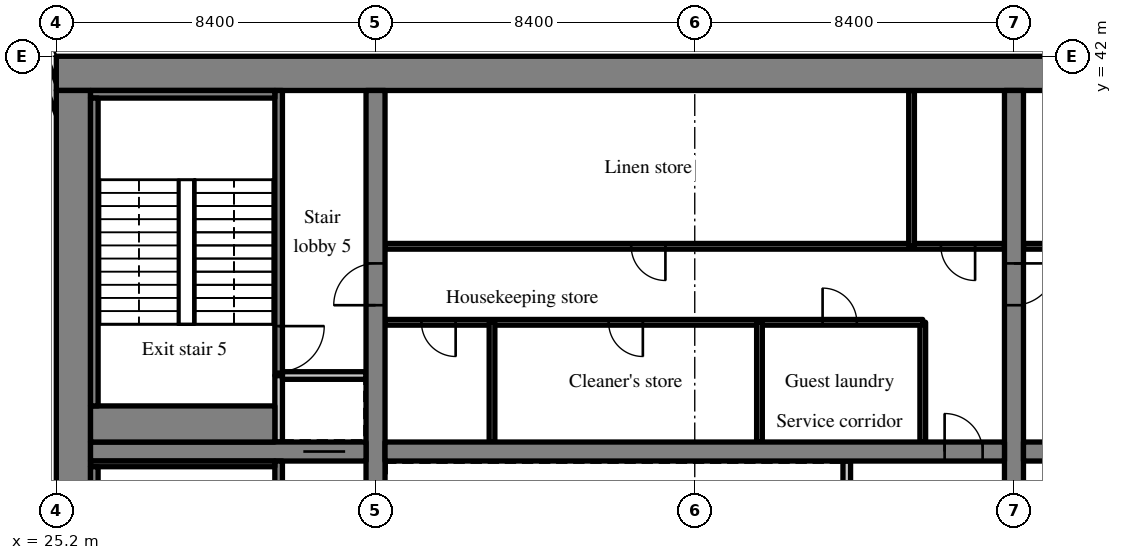
"""IFC4 building model, lengths in metres.
Left out: names, types, materials, properties, quantities, classifications, styles, units other than length and angle.
Written with IfcOpenShell. Run it as: python <this file> out.ifc"""

import sys

from ifc_helpers import new_model, si_unit, direction, frame, frame_2d, origin, place, context, subcontext, project, spatial, rectangle, extrude, source, transform, mapped, element, fill, save


model = new_model("IFC4")
c1 = context("Model", 3, precision=1e-05, world=origin(), true_north=direction((0.0, 1.0)))
c2 = subcontext(c1, "Body", "Model", "MODEL_VIEW")
j1 = project(units=[si_unit("LENGTHUNIT", "METRE"), si_unit("PLANEANGLEUNIT", "RADIAN")], contexts=[c1])
p1 = place(None, origin())
s1 = spatial("IfcSite", under=j1, at=p1, CompositionType="ELEMENT")
p2 = place(p1, origin())
s2 = spatial("IfcBuilding", under=s1, at=p2, CompositionType="ELEMENT")
p3 = place(p2, frame((0.0, 0.0, 114.2)))
s3 = spatial("IfcBuildingStorey", under=s2, at=p3, CompositionType="ELEMENT", Elevation=114.2)
m1 = source(origin(), c2, "Body", "SweptSolid", [
    extrude(rectangle(XDim=50.4, YDim=0.9, at=frame_2d((25.2, 0.0))), origin(), (0.0, 0.0, 1.0), 3.52),
])
p4 = place(p3, frame((25.2, 41.55, 0.0), z_axis=(0.0, 0.0, 1.0), x_axis=(1.0, 0.0, 0.0)))
e1 = element("IfcWall", 1, at=p4, inside=s3, PredefinedType="SHEAR", context=c2, shape_type="MappedRepresentation", body=[
    mapped(m1, transform((0.0, 0.0, 0.0), scale=1.0)),
])
m2 = source(origin(), c2, "Body", "SweptSolid", [
    extrude(rectangle(XDim=18.2, YDim=0.9, at=frame_2d((9.1, 0.0))), origin(), (0.0, 0.0, 1.0), 3.52),
])
p5 = place(p3, frame((25.65, 22.9, 0.0), z_axis=(0.0, 0.0, 1.0), x_axis=(0.0, 1.0, 0.0)))
e2 = element("IfcWall", 2, at=p5, inside=s3, PredefinedType="SHEAR", context=c2, shape_type="MappedRepresentation", body=[
    mapped(m2, transform((0.0, 0.0, 0.0), scale=1.0)),
])
m3 = source(origin(), c2, "Body", "SweptSolid", [
    extrude(rectangle(XDim=18.2, YDim=0.5, at=frame_2d((9.1, 0.0))), origin(), (0.0, 0.0, 1.0), 3.52),
])
p6 = place(p3, frame((33.6, 22.9, 0.0), z_axis=(0.0, 0.0, 1.0), x_axis=(0.0, 1.0, 0.0)))
e3 = element("IfcWall", 3, at=p6, inside=s3, PredefinedType="SHEAR", context=c2, shape_type="MappedRepresentation", body=[
    mapped(m3, transform((0.0, 0.0, 0.0), scale=1.0)),
])
m4 = source(origin(), c2, "Body", "SweptSolid", [
    extrude(rectangle(XDim=1.1, YDim=2.1, at=frame_2d((0.55, 1.05))), frame((0.0, 0.26, 0.0), z_axis=(0.0, -1.0, 0.0), x_axis=(1.0, 0.0, 0.0)), (0.0, 0.0, 1.0), 0.52),
])
p7 = place(p6, frame((12.55, 0.0, 0.0)))
e4 = element("IfcOpeningElement", 4, at=p7, cuts=e3, PredefinedType="OPENING", context=c2, shape_type="MappedRepresentation", body=[
    mapped(m4, transform((0.0, 0.0, 0.0), scale=1.0)),
])
p8 = place(p3, frame((50.4, 22.9, 0.0), z_axis=(0.0, 0.0, 1.0), x_axis=(0.0, 1.0, 0.0)))
e5 = element("IfcWall", 5, at=p8, inside=s3, PredefinedType="SHEAR", context=c2, shape_type="MappedRepresentation", body=[
    mapped(m3, transform((0.0, 0.0, 0.0), scale=1.0)),
])
p9 = place(p8, frame((12.55, 0.0, 0.0)))
e6 = element("IfcOpeningElement", 6, at=p9, cuts=e5, PredefinedType="OPENING", context=c2, shape_type="MappedRepresentation", body=[
    mapped(m4, transform((0.0, 0.0, 0.0), scale=1.0)),
])
m5 = source(origin(), c2, "Body", "SweptSolid", [
    extrude(rectangle(XDim=7.25, YDim=0.5, at=frame_2d((3.625, 0.0))), origin(), (0.0, 0.0, 1.0), 3.52),
])
p10 = place(p3, frame((26.1, 31.6, 0.0), z_axis=(0.0, 0.0, 1.0), x_axis=(1.0, 0.0, 0.0)))
e7 = element("IfcWall", 7, at=p10, inside=s3, PredefinedType="SHEAR", context=c2, shape_type="MappedRepresentation", body=[
    mapped(m5, transform((0.0, 0.0, 0.0), scale=1.0)),
])
p11 = place(p10, frame((5.6, 0.0, 0.0)))
e8 = element("IfcOpeningElement", 8, at=p11, cuts=e7, PredefinedType="OPENING", context=c2, shape_type="MappedRepresentation", body=[
    mapped(m4, transform((0.0, 0.0, 0.0), scale=1.0)),
])
m6 = source(origin(), c2, "Body", "SweptSolid", [
    extrude(rectangle(XDim=16.3, YDim=0.5, at=frame_2d((8.15, 0.0))), origin(), (0.0, 0.0, 1.0), 3.52),
])
p12 = place(p3, frame((33.85, 31.6, 0.0), z_axis=(0.0, 0.0, 1.0), x_axis=(1.0, 0.0, 0.0)))
e9 = element("IfcWall", 9, at=p12, inside=s3, PredefinedType="SHEAR", context=c2, shape_type="MappedRepresentation", body=[
    mapped(m6, transform((0.0, 0.0, 0.0), scale=1.0)),
])
m7 = source(origin(), c2, "Body", "SweptSolid", [
    extrude(rectangle(XDim=1.0, YDim=2.1, at=frame_2d((0.5, 1.05))), frame((0.0, 0.26, 0.0), z_axis=(0.0, -1.0, 0.0), x_axis=(1.0, 0.0, 0.0)), (0.0, 0.0, 1.0), 0.52),
])
p13 = place(p12, frame((14.725, 0.0, 0.0)))
e10 = element("IfcOpeningElement", 10, at=p13, cuts=e9, PredefinedType="OPENING", context=c2, shape_type="MappedRepresentation", body=[
    mapped(m7, transform((0.0, 0.0, 0.0), scale=1.0)),
])
m8 = source(origin(), c2, "Body", "SweptSolid", [
    extrude(rectangle(XDim=16.3, YDim=0.5, at=frame_2d((8.15, 0.0))), origin(), (0.0, 0.0, 1.0), 3.52),
])
p14 = place(p3, frame((50.65, 31.6, 0.0), z_axis=(0.0, 0.0, 1.0), x_axis=(1.0, 0.0, 0.0)))
e11 = element("IfcWall", 11, at=p14, inside=s3, PredefinedType="SHEAR", context=c2, shape_type="MappedRepresentation", body=[
    mapped(m8, transform((0.0, 0.0, 0.0), scale=1.0)),
])
p15 = place(p14, frame((0.575, 0.0, 0.0)))
e12 = element("IfcOpeningElement", 12, at=p15, cuts=e11, PredefinedType="OPENING", context=c2, shape_type="MappedRepresentation", body=[
    mapped(m7, transform((0.0, 0.0, 0.0), scale=1.0)),
])
m9 = source(origin(), c2, "Body", "SweptSolid", [
    extrude(rectangle(XDim=3.559, YDim=0.3, at=frame_2d((1.78, 0.0))), origin(), (0.0, 0.0, 1.0), 3.52),
])
p16 = place(p3, frame((25.55, 39.969, 0.0), z_axis=(0.0, 0.0, 1.0), x_axis=(-0.35779745313, 0.933799219604, 0.0)))
e13 = element("IfcWall", 13, at=p16, inside=s3, PredefinedType="SOLIDWALL", context=c2, shape_type="MappedRepresentation", body=[
    mapped(m9, transform((0.0, 0.0, 0.0), scale=1.0)),
])
m10 = source(origin(), c2, "Body", "SweptSolid", [
    extrude(rectangle(XDim=1.5, YDim=2.0, at=frame_2d((0.75, 1.0))), frame((0.0, 0.16, 0.0), z_axis=(0.0, -1.0, 0.0), x_axis=(1.0, 0.0, 0.0)), (0.0, 0.0, 1.0), 0.32),
])
p17 = place(p16, frame((1.903, 0.0, 0.9)))
e14 = element("IfcOpeningElement", 14, at=p17, cuts=e13, PredefinedType="OPENING", context=c2, shape_type="MappedRepresentation", body=[
    mapped(m10, transform((0.0, 0.0, 0.0), scale=1.0)),
])
m11 = source(origin(), c2, "Body", "SweptSolid", [
    extrude(rectangle(XDim=2.55, YDim=0.2, at=frame_2d((1.275, 0.0))), origin(), (0.0, 0.0, 1.0), 3.52),
])
p18 = place(p3, frame((46.0, 28.8, 0.0), z_axis=(0.0, 0.0, 1.0), x_axis=(0.0, 1.0, 0.0)))
e15 = element("IfcWall", 15, at=p18, inside=s3, PredefinedType="SOLIDWALL", context=c2, shape_type="MappedRepresentation", body=[
    mapped(m11, transform((0.0, 0.0, 0.0), scale=1.0)),
])
m12 = source(origin(), c2, "Body", "SweptSolid", [
    extrude(rectangle(XDim=3.15, YDim=0.15, at=frame_2d((1.575, 0.0))), origin(), (0.0, 0.0, 1.0), 3.52),
])
p19 = place(p3, frame((48.0, 31.85, 0.0), z_axis=(0.0, 0.0, 1.0), x_axis=(0.0, 1.0, 0.0)))
e16 = element("IfcWall", 16, at=p19, inside=s3, PredefinedType="PARTITIONING", context=c2, shape_type="MappedRepresentation", body=[
    mapped(m12, transform((0.0, 0.0, 0.0), scale=1.0)),
])
m13 = source(origin(), c2, "Body", "SweptSolid", [
    extrude(rectangle(XDim=14.15, YDim=0.15, at=frame_2d((7.075, 0.0))), origin(), (0.0, 0.0, 1.0), 3.52),
])
p20 = place(p3, frame((33.85, 35.0, 0.0), z_axis=(0.0, 0.0, 1.0), x_axis=(1.0, 0.0, 0.0)))
e17 = element("IfcWall", 17, at=p20, inside=s3, PredefinedType="PARTITIONING", context=c2, shape_type="MappedRepresentation", body=[
    mapped(m13, transform((0.0, 0.0, 0.0), scale=1.0)),
])
m14 = source(origin(), c2, "Body", "SweptSolid", [
    extrude(rectangle(XDim=0.9, YDim=2.1, at=frame_2d((0.45, 1.05))), frame((0.0, 0.085, 0.0), z_axis=(0.0, -1.0, 0.0), x_axis=(1.0, 0.0, 0.0)), (0.0, 0.0, 1.0), 0.17),
])
p21 = place(p20, frame((0.958, 0.0, 0.0)))
e18 = element("IfcOpeningElement", 18, at=p21, cuts=e17, PredefinedType="OPENING", context=c2, shape_type="MappedRepresentation", body=[
    mapped(m14, transform((0.0, 0.0, 0.0), scale=1.0)),
])
p22 = place(p20, frame((5.884, 0.0, 0.0)))
e19 = element("IfcOpeningElement", 19, at=p22, cuts=e17, PredefinedType="OPENING", context=c2, shape_type="MappedRepresentation", body=[
    mapped(m14, transform((0.0, 0.0, 0.0), scale=1.0)),
])
p23 = place(p20, frame((11.514, 0.0, 0.0)))
e20 = element("IfcOpeningElement", 20, at=p23, cuts=e17, PredefinedType="OPENING", context=c2, shape_type="MappedRepresentation", body=[
    mapped(m14, transform((0.0, 0.0, 0.0), scale=1.0)),
])
m15 = source(origin(), c2, "Body", "SweptSolid", [
    extrude(rectangle(XDim=16.3, YDim=0.15, at=frame_2d((8.15, 0.0))), origin(), (0.0, 0.0, 1.0), 3.52),
])
p24 = place(p3, frame((33.85, 37.0, 0.0), z_axis=(0.0, 0.0, 1.0), x_axis=(1.0, 0.0, 0.0)))
e21 = element("IfcWall", 21, at=p24, inside=s3, PredefinedType="PARTITIONING", context=c2, shape_type="MappedRepresentation", body=[
    mapped(m15, transform((0.0, 0.0, 0.0), scale=1.0)),
])
p25 = place(p24, frame((6.478, 0.0, 0.0)))
e22 = element("IfcOpeningElement", 22, at=p25, cuts=e21, PredefinedType="OPENING", context=c2, shape_type="MappedRepresentation", body=[
    mapped(m14, transform((0.0, 0.0, 0.0), scale=1.0)),
])
p26 = place(p24, frame((14.627, 0.0, 0.0)))
e23 = element("IfcOpeningElement", 23, at=p26, cuts=e21, PredefinedType="OPENING", context=c2, shape_type="MappedRepresentation", body=[
    mapped(m14, transform((0.0, 0.0, 0.0), scale=1.0)),
])
for number, where, z_axis, x_axis in (
    (24, (36.665, 31.85, 0.0), (0.0, 0.0, 1.0), (0.0, 1.0, 0.0)),
    (25, (43.703, 31.85, 0.0), (0.0, 0.0, 1.0), (0.0, 1.0, 0.0)),
):
    element("IfcWall", number, at=place(p3, frame(where, z_axis=z_axis, x_axis=x_axis)), inside=s3, PredefinedType="PARTITIONING", context=c2, shape_type="MappedRepresentation", body=[
        mapped(m12, transform((0.0, 0.0, 0.0), scale=1.0)),
    ])
m16 = source(origin(), c2, "Body", "SweptSolid", [
    extrude(rectangle(XDim=4.1, YDim=0.15, at=frame_2d((2.05, 0.0))), origin(), (0.0, 0.0, 1.0), 3.52),
])
p27 = place(p3, frame((47.705, 37.0, 0.0), z_axis=(0.0, 0.0, 1.0), x_axis=(0.0, 1.0, 0.0)))
e26 = element("IfcWall", 26, at=p27, inside=s3, PredefinedType="PARTITIONING", context=c2, shape_type="MappedRepresentation", body=[
    mapped(m16, transform((0.0, 0.0, 0.0), scale=1.0)),
])
m17 = source(origin(), c2, "Body", "SweptSolid", [
    extrude(rectangle(XDim=16.3, YDim=0.15, at=frame_2d((8.15, 0.0))), origin(), (0.0, 0.0, 1.0), 3.52),
])
p28 = place(p3, frame((66.95, 37.0, 0.0), z_axis=(0.0, 0.0, 1.0), x_axis=(-1.0, 0.0, 0.0)))
e27 = element("IfcWall", 27, at=p28, inside=s3, PredefinedType="PARTITIONING", context=c2, shape_type="MappedRepresentation", body=[
    mapped(m17, transform((0.0, 0.0, 0.0), scale=1.0)),
])
p29 = place(p28, frame((1.588, 0.0, 0.0)))
e28 = element("IfcOpeningElement", 28, at=p29, cuts=e27, PredefinedType="OPENING", context=c2, shape_type="MappedRepresentation", body=[
    mapped(m14, transform((0.0, 0.0, 0.0), scale=1.0)),
])
p30 = place(p28, frame((7.293, 0.0, 0.0)))
e29 = element("IfcOpeningElement", 29, at=p30, cuts=e27, PredefinedType="OPENING", context=c2, shape_type="MappedRepresentation", body=[
    mapped(m14, transform((0.0, 0.0, 0.0), scale=1.0)),
])
p31 = place(p28, frame((12.183, 0.0, 0.0)))
e30 = element("IfcOpeningElement", 30, at=p31, cuts=e27, PredefinedType="OPENING", context=c2, shape_type="MappedRepresentation", body=[
    mapped(m14, transform((0.0, 0.0, 0.0), scale=1.0)),
])
p32 = place(p28, frame((14.627, 0.0, 0.0)))
e31 = element("IfcOpeningElement", 31, at=p32, cuts=e27, PredefinedType="OPENING", context=c2, shape_type="MappedRepresentation", body=[
    mapped(m14, transform((0.0, 0.0, 0.0), scale=1.0)),
])
m18 = source(origin(), c2, "Body", "SweptSolid", [
    extrude(rectangle(XDim=8.45, YDim=0.2, at=frame_2d((4.225, 0.0))), origin(), (0.0, 0.0, 1.0), 3.52),
])
p33 = place(p3, frame((31.05, 22.9, 0.0), z_axis=(0.0, 0.0, 1.0), x_axis=(0.0, 1.0, 0.0)))
e32 = element("IfcWall", 32, at=p33, inside=s3, PredefinedType="SOLIDWALL", context=c2, shape_type="MappedRepresentation", body=[
    mapped(m18, transform((0.0, 0.0, 0.0), scale=1.0)),
])
m19 = source(origin(), c2, "Body", "SweptSolid", [
    extrude(rectangle(XDim=1.2, YDim=2.1, at=frame_2d((0.6, 1.05))), frame((0.0, 0.11, 0.0), z_axis=(0.0, -1.0, 0.0), x_axis=(1.0, 0.0, 0.0)), (0.0, 0.0, 1.0), 0.22),
])
p34 = place(p33, frame((0.7, 0.0, 0.0)))
e33 = element("IfcOpeningElement", 33, at=p34, cuts=e32, PredefinedType="OPENING", context=c2, shape_type="MappedRepresentation", body=[
    mapped(m19, transform((0.0, 0.0, 0.0), scale=1.0)),
])
m20 = source(origin(), c2, "Body", "SweptSolid", [
    extrude(rectangle(XDim=1.75, YDim=0.2, at=frame_2d((0.875, 0.0))), origin(), (0.0, 0.0, 1.0), 3.52),
])
p35 = place(p3, frame((31.05, 31.85, 0.0), z_axis=(0.0, 0.0, 1.0), x_axis=(0.0, 1.0, 0.0)))
e34 = element("IfcWall", 34, at=p35, inside=s3, PredefinedType="SOLIDWALL", context=c2, shape_type="MappedRepresentation", body=[
    mapped(m20, transform((0.0, 0.0, 0.0), scale=1.0)),
])
m21 = source(origin(), c2, "Body", "SweptSolid", [
    extrude(rectangle(XDim=2.2, YDim=0.2, at=frame_2d((1.1, 0.0))), origin(), (0.0, 0.0, 1.0), 3.52),
])
p36 = place(p3, frame((31.15, 33.6, 0.0), z_axis=(0.0, 0.0, 1.0), x_axis=(1.0, 0.0, 0.0)))
e35 = element("IfcWall", 35, at=p36, inside=s3, PredefinedType="SOLIDWALL", context=c2, shape_type="MappedRepresentation", body=[
    mapped(m21, transform((0.0, 0.0, 0.0), scale=1.0)),
])
m22 = source(origin(), c2, "Body", "SweptSolid", [
    extrude(rectangle(XDim=7.5, YDim=0.2, at=frame_2d((3.75, 0.0))), origin(), (0.0, 0.0, 1.0), 3.52),
])
p37 = place(p3, frame((31.05, 33.6, 0.0), z_axis=(0.0, 0.0, 1.0), x_axis=(0.0, 1.0, 0.0)))
e36 = element("IfcWall", 36, at=p37, inside=s3, PredefinedType="SOLIDWALL", context=c2, shape_type="MappedRepresentation", body=[
    mapped(m22, transform((0.0, 0.0, 0.0), scale=1.0)),
])
p38 = place(p37, frame((0.1, 0.0, 0.0)))
e37 = element("IfcOpeningElement", 37, at=p38, cuts=e36, PredefinedType="OPENING", context=c2, shape_type="MappedRepresentation", body=[
    mapped(m19, transform((0.0, 0.0, 0.0), scale=1.0)),
])
m23 = source(origin(), c2, "Body", "SweptSolid", [
    extrude(rectangle(XDim=4.85, YDim=0.15, at=frame_2d((2.425, 0.0))), origin(), (0.0, 0.0, 1.0), 3.52),
])
p39 = place(p3, frame((26.1, 31.275, 0.0), z_axis=(0.0, 0.0, 1.0), x_axis=(1.0, 0.0, 0.0)))
e38 = element("IfcWall", 38, at=p39, inside=s3, PredefinedType="SOLIDWALL", context=c2, shape_type="MappedRepresentation", body=[
    mapped(m23, transform((0.0, 0.0, 0.0), scale=1.0)),
])
m24 = source(origin(), c2, "Body", "SweptSolid", [
    extrude(rectangle(XDim=8.1, YDim=0.2, at=frame_2d((4.05, 0.0))), origin(), (0.0, 0.0, 1.0), 3.52),
])
p40 = place(p3, frame((26.2, 23.1, 0.0), z_axis=(0.0, 0.0, 1.0), x_axis=(0.0, 1.0, 0.0)))
e39 = element("IfcWall", 39, at=p40, inside=s3, PredefinedType="SOLIDWALL", context=c2, shape_type="MappedRepresentation", body=[
    mapped(m24, transform((0.0, 0.0, 0.0), scale=1.0)),
])
m25 = source(origin(), c2, "Body", "SweptSolid", [
    extrude(rectangle(XDim=4.85, YDim=0.2, at=frame_2d((2.425, 0.0))), origin(), (0.0, 0.0, 1.0), 3.52),
])
p41 = place(p3, frame((26.1, 41.0, 0.0), z_axis=(0.0, 0.0, 1.0), x_axis=(1.0, 0.0, 0.0)))
e40 = element("IfcWall", 40, at=p41, inside=s3, PredefinedType="SOLIDWALL", context=c2, shape_type="MappedRepresentation", body=[
    mapped(m25, transform((0.0, 0.0, 0.0), scale=1.0)),
])
m26 = source(origin(), c2, "Body", "SweptSolid", [
    extrude(rectangle(XDim=4.85, YDim=0.95, at=frame_2d((2.425, 0.0))), origin(), (0.0, 0.0, 1.0), 3.52),
])
p42 = place(p3, frame((26.1, 32.325, 0.0), z_axis=(0.0, 0.0, 1.0), x_axis=(1.0, 0.0, 0.0)))
e41 = element("IfcWall", 41, at=p42, inside=s3, PredefinedType="SOLIDWALL", context=c2, shape_type="MappedRepresentation", body=[
    mapped(m26, transform((0.0, 0.0, 0.0), scale=1.0)),
])
p43 = place(p3, frame((26.2, 32.8, 0.0), z_axis=(0.0, 0.0, 1.0), x_axis=(0.0, 1.0, 0.0)))
e42 = element("IfcWall", 42, at=p43, inside=s3, PredefinedType="SOLIDWALL", context=c2, shape_type="MappedRepresentation", body=[
    mapped(m24, transform((0.0, 0.0, 0.0), scale=1.0)),
])
m27 = source(origin(), c2, "Body", "SweptSolid", [
    extrude(rectangle(XDim=1.0, YDim=2.1, at=frame_2d((0.5, 1.05))), frame((0.0, 0.025, 0.0), z_axis=(0.0, -1.0, 0.0), x_axis=(1.0, 0.0, 0.0)), (0.0, 0.0, 1.0), 0.05),
])
p44 = place(p13, origin())
e43 = element("IfcDoor", 43, at=p44, inside=s3, OperationType="SINGLE_SWING_LEFT", PredefinedType="DOOR", context=c2, shape_type="MappedRepresentation", body=[
    mapped(m27, transform((0.0, 0.0, 0.0), scale=1.0)),
])
fill(e10, e43)
m28 = source(origin(), c2, "Body", "SweptSolid", [
    extrude(rectangle(XDim=0.9, YDim=2.1, at=frame_2d((0.45, 1.05))), frame((0.0, 0.025, 0.0), z_axis=(0.0, -1.0, 0.0), x_axis=(1.0, 0.0, 0.0)), (0.0, 0.0, 1.0), 0.05),
])
p45 = place(p21, origin())
e44 = element("IfcDoor", 44, at=p45, inside=s3, OperationType="SINGLE_SWING_RIGHT", PredefinedType="DOOR", context=c2, shape_type="MappedRepresentation", body=[
    mapped(m28, transform((0.0, 0.0, 0.0), scale=1.0)),
])
fill(e18, e44)
p46 = place(p22, origin())
e45 = element("IfcDoor", 45, at=p46, inside=s3, OperationType="SINGLE_SWING_RIGHT", PredefinedType="DOOR", context=c2, shape_type="MappedRepresentation", body=[
    mapped(m28, transform((0.0, 0.0, 0.0), scale=1.0)),
])
fill(e19, e45)
p47 = place(p23, origin())
e46 = element("IfcDoor", 46, at=p47, inside=s3, OperationType="SINGLE_SWING_LEFT", PredefinedType="DOOR", context=c2, shape_type="MappedRepresentation", body=[
    mapped(m28, transform((0.0, 0.0, 0.0), scale=1.0)),
])
fill(e20, e46)
p48 = place(p25, origin())
e47 = element("IfcDoor", 47, at=p48, inside=s3, OperationType="SINGLE_SWING_RIGHT", PredefinedType="DOOR", context=c2, shape_type="MappedRepresentation", body=[
    mapped(m28, transform((0.0, 0.0, 0.0), scale=1.0)),
])
fill(e22, e47)
p49 = place(p26, origin())
e48 = element("IfcDoor", 48, at=p49, inside=s3, OperationType="SINGLE_SWING_RIGHT", PredefinedType="DOOR", context=c2, shape_type="MappedRepresentation", body=[
    mapped(m28, transform((0.0, 0.0, 0.0), scale=1.0)),
])
fill(e23, e48)
m29 = source(origin(), c2, "Body", "SweptSolid", [
    extrude(rectangle(XDim=1.1, YDim=2.1, at=frame_2d((0.55, 1.05))), frame((0.0, 0.025, 0.0), z_axis=(0.0, -1.0, 0.0), x_axis=(1.0, 0.0, 0.0)), (0.0, 0.0, 1.0), 0.05),
])
p50 = place(p11, origin())
e49 = element("IfcDoor", 49, at=p50, inside=s3, OperationType="SLIDING_TO_RIGHT", PredefinedType="DOOR", context=c2, shape_type="MappedRepresentation", body=[
    mapped(m29, transform((0.0, 0.0, 0.0), scale=1.0)),
])
fill(e8, e49)
m30 = source(origin(), c2, "Body", "SweptSolid", [
    extrude(rectangle(XDim=1.2, YDim=2.1, at=frame_2d((0.6, 1.05))), frame((0.0, 0.025, 0.0), z_axis=(0.0, -1.0, 0.0), x_axis=(1.0, 0.0, 0.0)), (0.0, 0.0, 1.0), 0.05),
])
p51 = place(p38, origin())
e50 = element("IfcDoor", 50, at=p51, inside=s3, OperationType="SINGLE_SWING_RIGHT", PredefinedType="DOOR", context=c2, shape_type="MappedRepresentation", body=[
    mapped(m30, transform((0.0, 0.0, 0.0), scale=1.0)),
])
fill(e37, e50)
p52 = place(p7, origin())
e51 = element("IfcDoor", 51, at=p52, inside=s3, OperationType="SINGLE_SWING_LEFT", PredefinedType="DOOR", context=c2, shape_type="MappedRepresentation", body=[
    mapped(m29, transform((0.0, 0.0, 0.0), scale=1.0)),
])
fill(e4, e51)
p53 = place(p9, origin())
e52 = element("IfcDoor", 52, at=p53, inside=s3, OperationType="SINGLE_SWING_RIGHT", PredefinedType="DOOR", context=c2, shape_type="MappedRepresentation", body=[
    mapped(m29, transform((0.0, 0.0, 0.0), scale=1.0)),
])
fill(e6, e52)
save(model, sys.argv[1])
